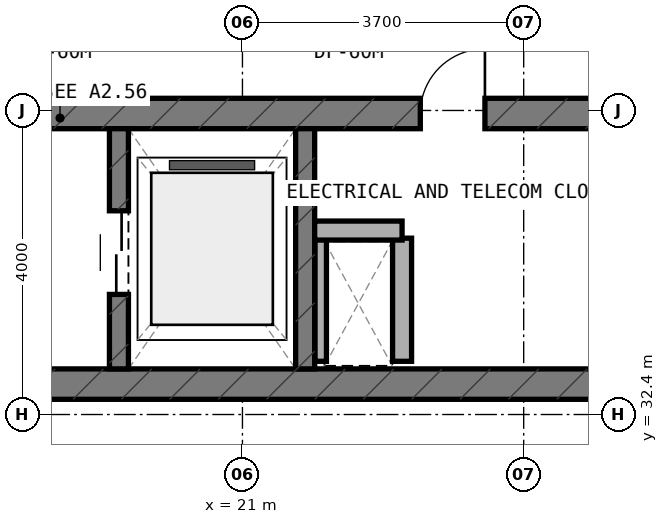
"""IFC4 building model, lengths in metres.
Left out: names, types, materials, properties, quantities, classifications, styles, units other than length and angle.
Written with IfcOpenShell. Run it as: python <this file> out.ifc"""

import sys

from ifc_helpers import new_model, si_unit, direction, frame, frame_2d, origin, place, context, subcontext, project, spatial, rectangle, extrude, element, fill, save


model = new_model("IFC4")
c1 = context("Model", 3, precision=1e-05, world=origin(), true_north=direction((0.0, 1.0)))
c2 = subcontext(c1, "Body", "Model", "MODEL_VIEW")
j1 = project(units=[si_unit("LENGTHUNIT", "METRE"), si_unit("PLANEANGLEUNIT", "RADIAN")], contexts=[c1])
p1 = place(None, origin())
s1 = spatial("IfcSite", under=j1, at=p1, CompositionType="ELEMENT")
p2 = place(p1, origin())
s2 = spatial("IfcBuilding", under=s1, at=p2, CompositionType="ELEMENT")
p3 = place(p2, frame((0.0, 0.0, 257.6)))
s3 = spatial("IfcBuildingStorey", under=s2, at=p3, CompositionType="ELEMENT", Elevation=257.6)
p4 = place(p3, frame((6.4, 32.8, 0.0), z_axis=(0.0, 0.0, 1.0), x_axis=(1.0, 0.0, 0.0)))
e1 = element("IfcWall", 1, at=p4, inside=s3, PredefinedType="SHEAR", context=c2, shape_type="SweptSolid", body=[
    extrude(rectangle(XDim=24.4, YDim=0.4, at=frame_2d((12.2, 0.0))), origin(), (0.0, 0.0, 1.0), 3.6),
])
p5 = place(p4, frame((6.05, 0.0, 0.0)))
e2 = element("IfcOpeningElement", 2, at=p5, cuts=e1, PredefinedType="OPENING", context=c2, shape_type="SweptSolid", body=[
    extrude(rectangle(XDim=1.1, YDim=2.15, at=frame_2d((0.55, 1.075))), frame((0.0, 0.21, 0.0), z_axis=(0.0, -1.0, 0.0), x_axis=(1.0, 0.0, 0.0)), (0.0, 0.0, 1.0), 0.42),
])
p6 = place(p3, frame((6.4, 36.36, 0.0), z_axis=(0.0, 0.0, 1.0), x_axis=(1.0, 0.0, 0.0)))
e3 = element("IfcWall", 3, at=p6, inside=s3, PredefinedType="SHEAR", context=c2, shape_type="SweptSolid", body=[
    extrude(rectangle(XDim=24.4, YDim=0.4, at=frame_2d((12.2, 0.0))), origin(), (0.0, 0.0, 1.0), 3.6),
])
p7 = place(p6, frame((9.15, 0.0, 0.0)))
e4 = element("IfcOpeningElement", 4, at=p7, cuts=e3, PredefinedType="OPENING", context=c2, shape_type="SweptSolid", body=[
    extrude(rectangle(XDim=1.2, YDim=2.15, at=frame_2d((0.6, 1.075))), frame((0.0, 0.21, 0.0), z_axis=(0.0, -1.0, 0.0), x_axis=(1.0, 0.0, 0.0)), (0.0, 0.0, 1.0), 0.42),
])
p8 = place(p6, frame((19.2, 0.0, 0.0)))
e5 = element("IfcOpeningElement", 5, at=p8, cuts=e3, PredefinedType="OPENING", context=c2, shape_type="SweptSolid", body=[
    extrude(rectangle(XDim=0.85, YDim=2.1, at=frame_2d((0.425, 1.05))), frame((0.0, 0.21, 0.0), z_axis=(0.0, -1.0, 0.0), x_axis=(1.0, 0.0, 0.0)), (0.0, 0.0, 1.0), 0.42),
])
p9 = place(p6, frame((16.94, 0.0, 0.0)))
e6 = element("IfcOpeningElement", 6, at=p9, cuts=e3, PredefinedType="OPENING", context=c2, shape_type="SweptSolid", body=[
    extrude(rectangle(XDim=0.85, YDim=2.1, at=frame_2d((0.425, 1.05))), frame((0.0, 0.21, 0.0), z_axis=(0.0, -1.0, 0.0), x_axis=(1.0, 0.0, 0.0)), (0.0, 0.0, 1.0), 0.42),
])
p10 = place(p3, frame((19.375, 33.0, 0.0), z_axis=(0.0, 0.0, 1.0), x_axis=(0.0, 1.0, 0.0)))
e7 = element("IfcWall", 7, at=p10, inside=s3, PredefinedType="STANDARD", context=c2, shape_type="SweptSolid", body=[
    extrude(rectangle(XDim=3.16, YDim=0.25, at=frame_2d((1.58, 0.0))), origin(), (0.0, 0.0, 1.0), 3.32),
])
p11 = place(p10, frame((0.98, 0.0, 0.0)))
e8 = element("IfcOpeningElement", 8, at=p11, cuts=e7, PredefinedType="OPENING", context=c2, shape_type="SweptSolid", body=[
    extrude(rectangle(XDim=1.1, YDim=2.15, at=frame_2d((0.55, 1.075))), frame((0.0, 0.135, 0.0), z_axis=(0.0, -1.0, 0.0), x_axis=(1.0, 0.0, 0.0)), (0.0, 0.0, 1.0), 0.27),
])
p12 = place(p3, frame((21.825, 33.0, 0.0), z_axis=(0.0, 0.0, 1.0), x_axis=(0.0, 1.0, 0.0)))
e9 = element("IfcWall", 9, at=p12, inside=s3, PredefinedType="STANDARD", context=c2, shape_type="SweptSolid", body=[
    extrude(rectangle(XDim=3.16, YDim=0.25, at=frame_2d((1.58, 0.0))), origin(), (0.0, 0.0, 1.0), 3.32),
])
p13 = place(p3, frame((22.03, 33.1, 0.0), z_axis=(0.0, 0.0, 1.0), x_axis=(0.0, 1.0, 0.0)))
e10 = element("IfcWall", 10, at=p13, inside=s3, PredefinedType="PARTITIONING", context=c2, shape_type="SweptSolid", body=[
    extrude(rectangle(XDim=1.62, YDim=0.15, at=frame_2d((0.81, 0.0))), origin(), (0.0, 0.0, 1.0), 3.32),
])
p14 = place(p3, frame((23.1, 33.1, 0.0), z_axis=(0.0, 0.0, 1.0), x_axis=(0.0, 1.0, 0.0)))
e11 = element("IfcWall", 11, at=p14, inside=s3, PredefinedType="SOLIDWALL", context=c2, shape_type="SweptSolid", body=[
    extrude(rectangle(XDim=1.62, YDim=0.25, at=frame_2d((0.81, 0.0))), origin(), (0.0, 0.0, 1.0), 3.32),
])
p15 = place(p3, frame((21.95, 34.82, 0.0), z_axis=(0.0, 0.0, 1.0), x_axis=(1.0, 0.0, 0.0)))
e12 = element("IfcWall", 12, at=p15, inside=s3, PredefinedType="SOLIDWALL", context=c2, shape_type="SweptSolid", body=[
    extrude(rectangle(XDim=1.15, YDim=0.25, at=frame_2d((0.575, 0.0))), origin(), (0.0, 0.0, 1.0), 3.32),
])
p16 = place(p11, origin())
e13 = element("IfcDoor", 13, at=p16, inside=s3, OperationType="DOUBLE_DOOR_SLIDING", PredefinedType="DOOR", context=c2, shape_type="SweptSolid", body=[
    extrude(rectangle(XDim=1.1, YDim=2.15, at=frame_2d((0.55, 1.075))), frame((0.0, 0.025, 0.0), z_axis=(0.0, -1.0, 0.0), x_axis=(1.0, 0.0, 0.0)), (0.0, 0.0, 1.0), 0.05),
])
fill(e8, e13)
p17 = place(p9, origin())
e14 = element("IfcDoor", 14, at=p17, inside=s3, OperationType="SINGLE_SWING_RIGHT", PredefinedType="DOOR", context=c2, shape_type="SweptSolid", body=[
    extrude(rectangle(XDim=0.85, YDim=2.1, at=frame_2d((0.425, 1.05))), frame((0.0, 0.025, 0.0), z_axis=(0.0, -1.0, 0.0), x_axis=(1.0, 0.0, 0.0)), (0.0, 0.0, 1.0), 0.05),
])
fill(e6, e14)
save(model, sys.argv[1])
